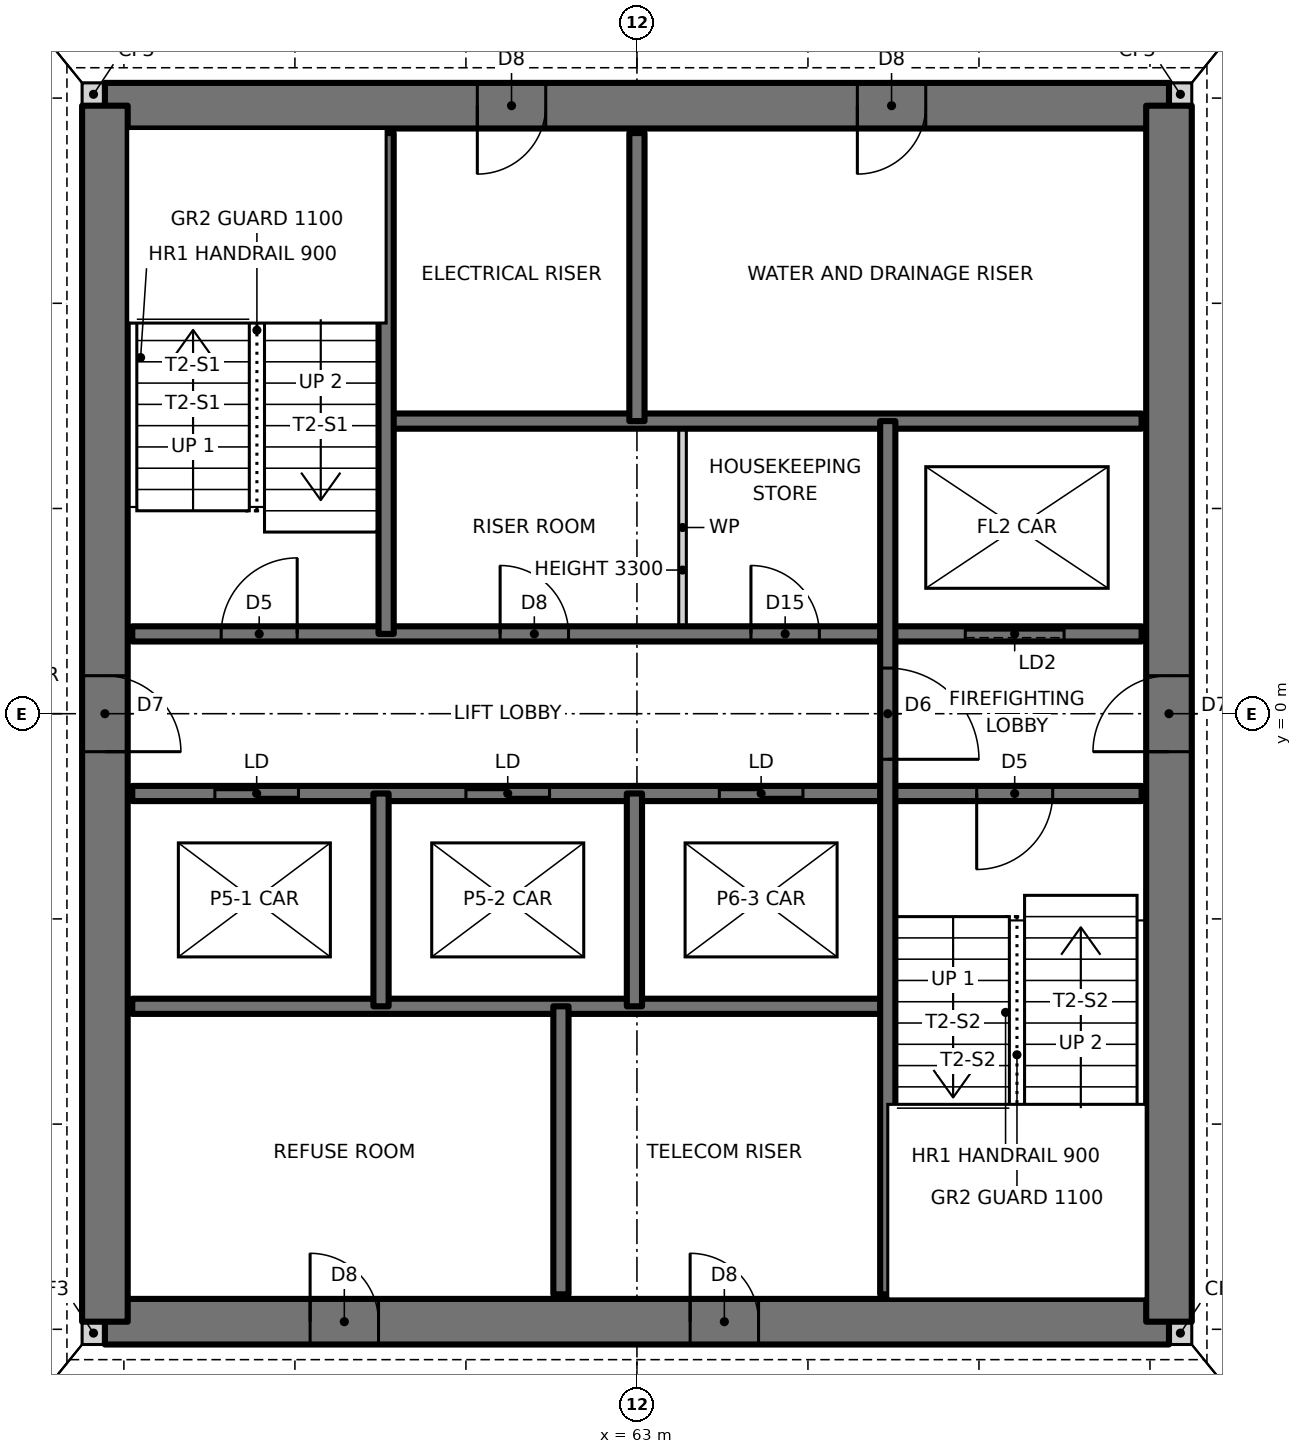
"""IFC4 building model, lengths in metres.
Left out: names, types, materials, properties, quantities, classifications, styles, units other than length and angle.
Written with IfcOpenShell. Run it as: python <this file> out.ifc"""

import sys

from ifc_helpers import new_model, si_unit, direction, frame, frame_2d, origin, place, context, subcontext, project, spatial, rectangle, extrude, element, fill, save


model = new_model("IFC4")
c1 = context("Model", 3, precision=1e-05, world=origin(), true_north=direction((0.0, 1.0)))
c2 = subcontext(c1, "Body", "Model", "MODEL_VIEW")
j1 = project(units=[si_unit("LENGTHUNIT", "METRE"), si_unit("PLANEANGLEUNIT", "RADIAN")], contexts=[c1])
p1 = place(None, origin())
s1 = spatial("IfcSite", under=j1, at=p1, CompositionType="ELEMENT")
p2 = place(p1, origin())
s2 = spatial("IfcBuilding", under=s1, at=p2, CompositionType="ELEMENT")
p3 = place(p2, frame((0.0, 0.0, 112.0)))
s3 = spatial("IfcBuildingStorey", under=s2, at=p3, CompositionType="ELEMENT", Elevation=112.0)
for number, where, z_axis, x_axis in (
    (1, (55.7, -8.15, 0.0), (0.0, 0.0, 1.0), (1.0, 0.0, 0.0)),
    (2, (70.0, -8.15, 0.0), (0.0, 0.0, 1.0), (1.0, 0.0, 0.0)),
    (3, (70.0, 8.15, 0.0), (0.0, 0.0, 1.0), (1.0, 0.0, 0.0)),
    (4, (55.7, 8.15, 0.0), (0.0, 0.0, 1.0), (1.0, 0.0, 0.0)),
):
    element("IfcWall", number, at=place(p3, frame(where, z_axis=z_axis, x_axis=x_axis)), inside=s3, PredefinedType="SOLIDWALL", context=c2, shape_type="SweptSolid", body=[
        extrude(rectangle(XDim=0.3, YDim=0.3, at=frame_2d((0.15, 0.0))), origin(), (0.0, 0.0, 1.0), 3.5),
    ])
p4 = place(p3, frame((56.0, -8.0, 0.0), z_axis=(0.0, 0.0, 1.0), x_axis=(1.0, 0.0, 0.0)))
e5 = element("IfcWall", 5, at=p4, inside=s3, PredefinedType="SHEAR", context=c2, shape_type="SweptSolid", body=[
    extrude(rectangle(XDim=14.0, YDim=0.6, at=frame_2d((7.0, 0.0))), origin(), (0.0, 0.0, 1.0), 3.5),
])
p5 = place(p4, frame((2.7, 0.0, 0.0)))
e6 = element("IfcOpeningElement", 6, at=p5, cuts=e5, PredefinedType="OPENING", context=c2, shape_type="SweptSolid", body=[
    extrude(rectangle(XDim=0.9, YDim=2.1, at=frame_2d((0.45, 1.05))), frame((0.0, 0.31, 0.0), z_axis=(0.0, -1.0, 0.0), x_axis=(1.0, 0.0, 0.0)), (0.0, 0.0, 1.0), 0.62),
])
p6 = place(p4, frame((7.7, 0.0, 0.0)))
e7 = element("IfcOpeningElement", 7, at=p6, cuts=e5, PredefinedType="OPENING", context=c2, shape_type="SweptSolid", body=[
    extrude(rectangle(XDim=0.9, YDim=2.1, at=frame_2d((0.45, 1.05))), frame((0.0, 0.31, 0.0), z_axis=(0.0, -1.0, 0.0), x_axis=(1.0, 0.0, 0.0)), (0.0, 0.0, 1.0), 0.62),
])
p7 = place(p3, frame((70.0, 8.0, 0.0), z_axis=(0.0, 0.0, 1.0), x_axis=(-1.0, 0.0, 0.0)))
e8 = element("IfcWall", 8, at=p7, inside=s3, PredefinedType="SHEAR", context=c2, shape_type="SweptSolid", body=[
    extrude(rectangle(XDim=14.0, YDim=0.6, at=frame_2d((7.0, 0.0))), origin(), (0.0, 0.0, 1.0), 3.5),
])
p8 = place(p7, frame((8.2, 0.0, 0.0)))
e9 = element("IfcOpeningElement", 9, at=p8, cuts=e8, PredefinedType="OPENING", context=c2, shape_type="SweptSolid", body=[
    extrude(rectangle(XDim=0.9, YDim=2.1, at=frame_2d((0.45, 1.05))), frame((0.0, 0.31, 0.0), z_axis=(0.0, -1.0, 0.0), x_axis=(1.0, 0.0, 0.0)), (0.0, 0.0, 1.0), 0.62),
])
p9 = place(p7, frame((3.2, 0.0, 0.0)))
e10 = element("IfcOpeningElement", 10, at=p9, cuts=e8, PredefinedType="OPENING", context=c2, shape_type="SweptSolid", body=[
    extrude(rectangle(XDim=0.9, YDim=2.1, at=frame_2d((0.45, 1.05))), frame((0.0, 0.31, 0.0), z_axis=(0.0, -1.0, 0.0), x_axis=(1.0, 0.0, 0.0)), (0.0, 0.0, 1.0), 0.62),
])
p10 = place(p3, frame((70.0, -8.0, 0.0), z_axis=(0.0, 0.0, 1.0), x_axis=(0.0, 1.0, 0.0)))
e11 = element("IfcWall", 11, at=p10, inside=s3, PredefinedType="SHEAR", context=c2, shape_type="SweptSolid", body=[
    extrude(rectangle(XDim=16.0, YDim=0.6, at=frame_2d((8.0, 0.0))), origin(), (0.0, 0.0, 1.0), 3.5),
])
p11 = place(p10, frame((7.5, 0.0, 0.0)))
e12 = element("IfcOpeningElement", 12, at=p11, cuts=e11, PredefinedType="OPENING", context=c2, shape_type="SweptSolid", body=[
    extrude(rectangle(XDim=1.0, YDim=2.1, at=frame_2d((0.5, 1.05))), frame((0.0, 0.31, 0.0), z_axis=(0.0, -1.0, 0.0), x_axis=(1.0, 0.0, 0.0)), (0.0, 0.0, 1.0), 0.62),
])
p12 = place(p3, frame((56.0, 8.0, 0.0), z_axis=(0.0, 0.0, 1.0), x_axis=(0.0, -1.0, 0.0)))
e13 = element("IfcWall", 13, at=p12, inside=s3, PredefinedType="SHEAR", context=c2, shape_type="SweptSolid", body=[
    extrude(rectangle(XDim=16.0, YDim=0.6, at=frame_2d((8.0, 0.0))), origin(), (0.0, 0.0, 1.0), 3.5),
])
p13 = place(p12, frame((7.5, 0.0, 0.0)))
e14 = element("IfcOpeningElement", 14, at=p13, cuts=e13, PredefinedType="OPENING", context=c2, shape_type="SweptSolid", body=[
    extrude(rectangle(XDim=1.0, YDim=2.1, at=frame_2d((0.5, 1.05))), frame((0.0, 0.31, 0.0), z_axis=(0.0, -1.0, 0.0), x_axis=(1.0, 0.0, 0.0)), (0.0, 0.0, 1.0), 0.62),
])
p14 = place(p3, frame((56.36, -3.85, 0.0), z_axis=(0.0, 0.0, 1.0), x_axis=(1.0, 0.0, 0.0)))
e15 = element("IfcWall", 15, at=p14, inside=s3, PredefinedType="SOLIDWALL", context=c2, shape_type="SweptSolid", body=[
    extrude(rectangle(XDim=9.94, YDim=0.2, at=frame_2d((4.97, 0.0))), origin(), (0.0, 0.0, 1.0), 3.5),
])
p15 = place(p3, frame((56.36, -1.05, 0.0), z_axis=(0.0, 0.0, 1.0), x_axis=(1.0, 0.0, 0.0)))
e16 = element("IfcWall", 16, at=p15, inside=s3, PredefinedType="SOLIDWALL", context=c2, shape_type="SweptSolid", body=[
    extrude(rectangle(XDim=13.28, YDim=0.2, at=frame_2d((6.64, 0.0))), origin(), (0.0, 0.0, 1.0), 3.5),
])
p16 = place(p15, frame((11.11, 0.0, 0.0)))
e17 = element("IfcOpeningElement", 17, at=p16, cuts=e16, PredefinedType="OPENING", context=c2, shape_type="SweptSolid", body=[
    extrude(rectangle(XDim=1.0, YDim=2.1, at=frame_2d((0.5, 1.05))), frame((0.0, 0.11, 0.0), z_axis=(0.0, -1.0, 0.0), x_axis=(1.0, 0.0, 0.0)), (0.0, 0.0, 1.0), 0.22),
])
p17 = place(p15, frame((1.087, 0.0, 0.0)))
e18 = element("IfcOpeningElement", 18, at=p17, cuts=e16, PredefinedType="OPENING", context=c2, shape_type="SweptSolid", body=[
    extrude(rectangle(XDim=1.1, YDim=2.1, at=frame_2d((0.55, 1.05))), frame((0.0, 0.11, 0.0), z_axis=(0.0, -1.0, 0.0), x_axis=(1.0, 0.0, 0.0)), (0.0, 0.0, 1.0), 0.22),
])
p18 = place(p15, frame((4.39, 0.0, 0.0)))
e19 = element("IfcOpeningElement", 19, at=p18, cuts=e16, PredefinedType="OPENING", context=c2, shape_type="SweptSolid", body=[
    extrude(rectangle(XDim=1.1, YDim=2.1, at=frame_2d((0.55, 1.05))), frame((0.0, 0.11, 0.0), z_axis=(0.0, -1.0, 0.0), x_axis=(1.0, 0.0, 0.0)), (0.0, 0.0, 1.0), 0.22),
])
p19 = place(p15, frame((7.724, 0.0, 0.0)))
e20 = element("IfcOpeningElement", 20, at=p19, cuts=e16, PredefinedType="OPENING", context=c2, shape_type="SweptSolid", body=[
    extrude(rectangle(XDim=1.1, YDim=2.1, at=frame_2d((0.55, 1.05))), frame((0.0, 0.11, 0.0), z_axis=(0.0, -1.0, 0.0), x_axis=(1.0, 0.0, 0.0)), (0.0, 0.0, 1.0), 0.22),
])
p20 = place(p3, frame((56.36, 1.05, 0.0), z_axis=(0.0, 0.0, 1.0), x_axis=(1.0, 0.0, 0.0)))
e21 = element("IfcWall", 21, at=p20, inside=s3, PredefinedType="SOLIDWALL", context=c2, shape_type="SweptSolid", body=[
    extrude(rectangle(XDim=13.28, YDim=0.2, at=frame_2d((6.64, 0.0))), origin(), (0.0, 0.0, 1.0), 3.5),
])
p21 = place(p20, frame((1.17, 0.0, 0.0)))
e22 = element("IfcOpeningElement", 22, at=p21, cuts=e21, PredefinedType="OPENING", context=c2, shape_type="SweptSolid", body=[
    extrude(rectangle(XDim=1.0, YDim=2.1, at=frame_2d((0.5, 1.05))), frame((0.0, 0.11, 0.0), z_axis=(0.0, -1.0, 0.0), x_axis=(1.0, 0.0, 0.0)), (0.0, 0.0, 1.0), 0.22),
])
p22 = place(p20, frame((4.84, 0.0, 0.0)))
e23 = element("IfcOpeningElement", 23, at=p22, cuts=e21, PredefinedType="OPENING", context=c2, shape_type="SweptSolid", body=[
    extrude(rectangle(XDim=0.9, YDim=2.1, at=frame_2d((0.45, 1.05))), frame((0.0, 0.11, 0.0), z_axis=(0.0, -1.0, 0.0), x_axis=(1.0, 0.0, 0.0)), (0.0, 0.0, 1.0), 0.22),
])
p23 = place(p20, frame((8.14, 0.0, 0.0)))
e24 = element("IfcOpeningElement", 24, at=p23, cuts=e21, PredefinedType="OPENING", context=c2, shape_type="SweptSolid", body=[
    extrude(rectangle(XDim=0.9, YDim=2.1, at=frame_2d((0.45, 1.05))), frame((0.0, 0.11, 0.0), z_axis=(0.0, -1.0, 0.0), x_axis=(1.0, 0.0, 0.0)), (0.0, 0.0, 1.0), 0.22),
])
p24 = place(p20, frame((10.96, 0.0, 0.0)))
e25 = element("IfcOpeningElement", 25, at=p24, cuts=e21, PredefinedType="OPENING", context=c2, shape_type="SweptSolid", body=[
    extrude(rectangle(XDim=1.3, YDim=2.1, at=frame_2d((0.65, 1.05))), frame((0.0, 0.11, 0.0), z_axis=(0.0, -1.0, 0.0), x_axis=(1.0, 0.0, 0.0)), (0.0, 0.0, 1.0), 0.22),
])
p25 = place(p3, frame((59.7, 3.85, 0.0), z_axis=(0.0, 0.0, 1.0), x_axis=(1.0, 0.0, 0.0)))
e26 = element("IfcWall", 26, at=p25, inside=s3, PredefinedType="SOLIDWALL", context=c2, shape_type="SweptSolid", body=[
    extrude(rectangle(XDim=9.94, YDim=0.2, at=frame_2d((4.97, 0.0))), origin(), (0.0, 0.0, 1.0), 3.5),
])
p26 = place(p3, frame((66.3, -7.64, 0.0), z_axis=(0.0, 0.0, 1.0), x_axis=(0.0, 1.0, 0.0)))
e27 = element("IfcWall", 27, at=p26, inside=s3, PredefinedType="SOLIDWALL", context=c2, shape_type="SweptSolid", body=[
    extrude(rectangle(XDim=11.49, YDim=0.2, at=frame_2d((5.745, 0.0))), origin(), (0.0, 0.0, 1.0), 3.5),
])
p27 = place(p26, frame((7.04, 0.0, 0.0)))
e28 = element("IfcOpeningElement", 28, at=p27, cuts=e27, PredefinedType="OPENING", context=c2, shape_type="SweptSolid", body=[
    extrude(rectangle(XDim=1.2, YDim=2.1, at=frame_2d((0.6, 1.05))), frame((0.0, 0.11, 0.0), z_axis=(0.0, -1.0, 0.0), x_axis=(1.0, 0.0, 0.0)), (0.0, 0.0, 1.0), 0.22),
])
p28 = place(p3, frame((63.6, 1.05, 0.0), z_axis=(0.0, 0.0, 1.0), x_axis=(0.0, 1.0, 0.0)))
e29 = element("IfcWall", 29, at=p28, inside=s3, PredefinedType="PARTITIONING", context=c2, shape_type="SweptSolid", body=[
    extrude(rectangle(XDim=2.8, YDim=0.1, at=frame_2d((1.4, 0.0))), origin(), (0.0, 0.0, 1.0), 3.3),
])
p29 = place(p3, frame((63.0, 3.85, 0.0), z_axis=(0.0, 0.0, 1.0), x_axis=(0.0, 1.0, 0.0)))
e30 = element("IfcWall", 30, at=p29, inside=s3, PredefinedType="SOLIDWALL", context=c2, shape_type="SweptSolid", body=[
    extrude(rectangle(XDim=3.79, YDim=0.2, at=frame_2d((1.895, 0.0))), origin(), (0.0, 0.0, 1.0), 3.5),
])
p30 = place(p3, frame((62.967, -3.85, 0.0), z_axis=(0.0, 0.0, 1.0), x_axis=(0.0, 1.0, 0.0)))
e31 = element("IfcWall", 31, at=p30, inside=s3, PredefinedType="SOLIDWALL", context=c2, shape_type="SweptSolid", body=[
    extrude(rectangle(XDim=2.8, YDim=0.2, at=frame_2d((1.4, 0.0))), origin(), (0.0, 0.0, 1.0), 3.5),
])
p31 = place(p3, frame((62.0, -7.64, 0.0), z_axis=(0.0, 0.0, 1.0), x_axis=(0.0, 1.0, 0.0)))
e32 = element("IfcWall", 32, at=p31, inside=s3, PredefinedType="SOLIDWALL", context=c2, shape_type="SweptSolid", body=[
    extrude(rectangle(XDim=3.79, YDim=0.2, at=frame_2d((1.895, 0.0))), origin(), (0.0, 0.0, 1.0), 3.5),
])
p32 = place(p3, frame((59.7, 1.05, 0.0), z_axis=(0.0, 0.0, 1.0), x_axis=(0.0, 1.0, 0.0)))
e33 = element("IfcWall", 33, at=p32, inside=s3, PredefinedType="SOLIDWALL", context=c2, shape_type="SweptSolid", body=[
    extrude(rectangle(XDim=6.59, YDim=0.2, at=frame_2d((3.295, 0.0))), origin(), (0.0, 0.0, 1.0), 3.5),
])
p33 = place(p3, frame((59.633, -3.85, 0.0), z_axis=(0.0, 0.0, 1.0), x_axis=(0.0, 1.0, 0.0)))
e34 = element("IfcWall", 34, at=p33, inside=s3, PredefinedType="SOLIDWALL", context=c2, shape_type="SweptSolid", body=[
    extrude(rectangle(XDim=2.8, YDim=0.2, at=frame_2d((1.4, 0.0))), origin(), (0.0, 0.0, 1.0), 3.5),
])
p34 = place(p21, origin())
e35 = element("IfcDoor", 35, at=p34, inside=s3, OperationType="SINGLE_SWING_RIGHT", PredefinedType="DOOR", context=c2, shape_type="SweptSolid", body=[
    extrude(rectangle(XDim=1.0, YDim=2.1, at=frame_2d((0.5, 1.05))), frame((0.0, 0.025, 0.0), z_axis=(0.0, -1.0, 0.0), x_axis=(1.0, 0.0, 0.0)), (0.0, 0.0, 1.0), 0.05),
])
fill(e22, e35)
p35 = place(p16, frame((1.0, 0.0, 0.0), z_axis=(0.0, 0.0, 1.0), x_axis=(-1.0, 0.0, 0.0)))
e36 = element("IfcDoor", 36, at=p35, inside=s3, OperationType="SINGLE_SWING_RIGHT", PredefinedType="DOOR", context=c2, shape_type="SweptSolid", body=[
    extrude(rectangle(XDim=1.0, YDim=2.1, at=frame_2d((0.5, 1.05))), frame((0.0, 0.025, 0.0), z_axis=(0.0, -1.0, 0.0), x_axis=(1.0, 0.0, 0.0)), (0.0, 0.0, 1.0), 0.05),
])
fill(e17, e36)
p36 = place(p27, frame((1.2, 0.0, 0.0), z_axis=(0.0, 0.0, 1.0), x_axis=(-1.0, 0.0, 0.0)))
e37 = element("IfcDoor", 37, at=p36, inside=s3, OperationType="SINGLE_SWING_RIGHT", PredefinedType="DOOR", context=c2, shape_type="SweptSolid", body=[
    extrude(rectangle(XDim=1.2, YDim=2.1, at=frame_2d((0.6, 1.05))), frame((0.0, 0.025, 0.0), z_axis=(0.0, -1.0, 0.0), x_axis=(1.0, 0.0, 0.0)), (0.0, 0.0, 1.0), 0.05),
])
fill(e28, e37)
p37 = place(p22, origin())
e38 = element("IfcDoor", 38, at=p37, inside=s3, OperationType="SINGLE_SWING_LEFT", PredefinedType="DOOR", context=c2, shape_type="SweptSolid", body=[
    extrude(rectangle(XDim=0.9, YDim=2.1, at=frame_2d((0.45, 1.05))), frame((0.0, 0.025, 0.0), z_axis=(0.0, -1.0, 0.0), x_axis=(1.0, 0.0, 0.0)), (0.0, 0.0, 1.0), 0.05),
])
fill(e23, e38)
p38 = place(p23, origin())
e39 = element("IfcDoor", 39, at=p38, inside=s3, OperationType="SINGLE_SWING_LEFT", PredefinedType="DOOR", context=c2, shape_type="SweptSolid", body=[
    extrude(rectangle(XDim=0.9, YDim=2.1, at=frame_2d((0.45, 1.05))), frame((0.0, 0.025, 0.0), z_axis=(0.0, -1.0, 0.0), x_axis=(1.0, 0.0, 0.0)), (0.0, 0.0, 1.0), 0.05),
])
fill(e24, e39)
p39 = place(p13, origin())
e40 = element("IfcDoor", 40, at=p39, inside=s3, OperationType="SINGLE_SWING_RIGHT", PredefinedType="DOOR", context=c2, shape_type="SweptSolid", body=[
    extrude(rectangle(XDim=1.0, YDim=2.1, at=frame_2d((0.5, 1.05))), frame((0.0, 0.025, 0.0), z_axis=(0.0, -1.0, 0.0), x_axis=(1.0, 0.0, 0.0)), (0.0, 0.0, 1.0), 0.05),
])
fill(e14, e40)
p40 = place(p11, origin())
e41 = element("IfcDoor", 41, at=p40, inside=s3, OperationType="SINGLE_SWING_LEFT", PredefinedType="DOOR", context=c2, shape_type="SweptSolid", body=[
    extrude(rectangle(XDim=1.0, YDim=2.1, at=frame_2d((0.5, 1.05))), frame((0.0, 0.025, 0.0), z_axis=(0.0, -1.0, 0.0), x_axis=(1.0, 0.0, 0.0)), (0.0, 0.0, 1.0), 0.05),
])
fill(e12, e41)
p41 = place(p8, origin())
e42 = element("IfcDoor", 42, at=p41, inside=s3, OperationType="SINGLE_SWING_RIGHT", PredefinedType="DOOR", context=c2, shape_type="SweptSolid", body=[
    extrude(rectangle(XDim=0.9, YDim=2.1, at=frame_2d((0.45, 1.05))), frame((0.0, 0.025, 0.0), z_axis=(0.0, -1.0, 0.0), x_axis=(1.0, 0.0, 0.0)), (0.0, 0.0, 1.0), 0.05),
])
fill(e9, e42)
p42 = place(p9, origin())
e43 = element("IfcDoor", 43, at=p42, inside=s3, OperationType="SINGLE_SWING_RIGHT", PredefinedType="DOOR", context=c2, shape_type="SweptSolid", body=[
    extrude(rectangle(XDim=0.9, YDim=2.1, at=frame_2d((0.45, 1.05))), frame((0.0, 0.025, 0.0), z_axis=(0.0, -1.0, 0.0), x_axis=(1.0, 0.0, 0.0)), (0.0, 0.0, 1.0), 0.05),
])
fill(e10, e43)
p43 = place(p5, origin())
e44 = element("IfcDoor", 44, at=p43, inside=s3, OperationType="SINGLE_SWING_LEFT", PredefinedType="DOOR", context=c2, shape_type="SweptSolid", body=[
    extrude(rectangle(XDim=0.9, YDim=2.1, at=frame_2d((0.45, 1.05))), frame((0.0, 0.025, 0.0), z_axis=(0.0, -1.0, 0.0), x_axis=(1.0, 0.0, 0.0)), (0.0, 0.0, 1.0), 0.05),
])
fill(e6, e44)
p44 = place(p6, origin())
e45 = element("IfcDoor", 45, at=p44, inside=s3, OperationType="SINGLE_SWING_LEFT", PredefinedType="DOOR", context=c2, shape_type="SweptSolid", body=[
    extrude(rectangle(XDim=0.9, YDim=2.1, at=frame_2d((0.45, 1.05))), frame((0.0, 0.025, 0.0), z_axis=(0.0, -1.0, 0.0), x_axis=(1.0, 0.0, 0.0)), (0.0, 0.0, 1.0), 0.05),
])
fill(e7, e45)
p45 = place(p17, origin())
e46 = element("IfcDoor", 46, at=p45, inside=s3, OperationType="DOUBLE_DOOR_SLIDING", PredefinedType="DOOR", context=c2, shape_type="SweptSolid", body=[
    extrude(rectangle(XDim=1.1, YDim=2.1, at=frame_2d((0.55, 1.05))), frame((0.0, 0.025, 0.0), z_axis=(0.0, -1.0, 0.0), x_axis=(1.0, 0.0, 0.0)), (0.0, 0.0, 1.0), 0.05),
])
fill(e18, e46)
p46 = place(p18, origin())
e47 = element("IfcDoor", 47, at=p46, inside=s3, OperationType="DOUBLE_DOOR_SLIDING", PredefinedType="DOOR", context=c2, shape_type="SweptSolid", body=[
    extrude(rectangle(XDim=1.1, YDim=2.1, at=frame_2d((0.55, 1.05))), frame((0.0, 0.025, 0.0), z_axis=(0.0, -1.0, 0.0), x_axis=(1.0, 0.0, 0.0)), (0.0, 0.0, 1.0), 0.05),
])
fill(e19, e47)
p47 = place(p19, origin())
e48 = element("IfcDoor", 48, at=p47, inside=s3, OperationType="DOUBLE_DOOR_SLIDING", PredefinedType="DOOR", context=c2, shape_type="SweptSolid", body=[
    extrude(rectangle(XDim=1.1, YDim=2.1, at=frame_2d((0.55, 1.05))), frame((0.0, 0.025, 0.0), z_axis=(0.0, -1.0, 0.0), x_axis=(1.0, 0.0, 0.0)), (0.0, 0.0, 1.0), 0.05),
])
fill(e20, e48)
p48 = place(p24, origin())
e49 = element("IfcDoor", 49, at=p48, inside=s3, OperationType="SLIDING_TO_LEFT", PredefinedType="DOOR", context=c2, shape_type="SweptSolid", body=[
    extrude(rectangle(XDim=1.3, YDim=2.1, at=frame_2d((0.65, 1.05))), frame((0.0, 0.025, 0.0), z_axis=(0.0, -1.0, 0.0), x_axis=(1.0, 0.0, 0.0)), (0.0, 0.0, 1.0), 0.05),
])
fill(e25, e49)
save(model, sys.argv[1])
